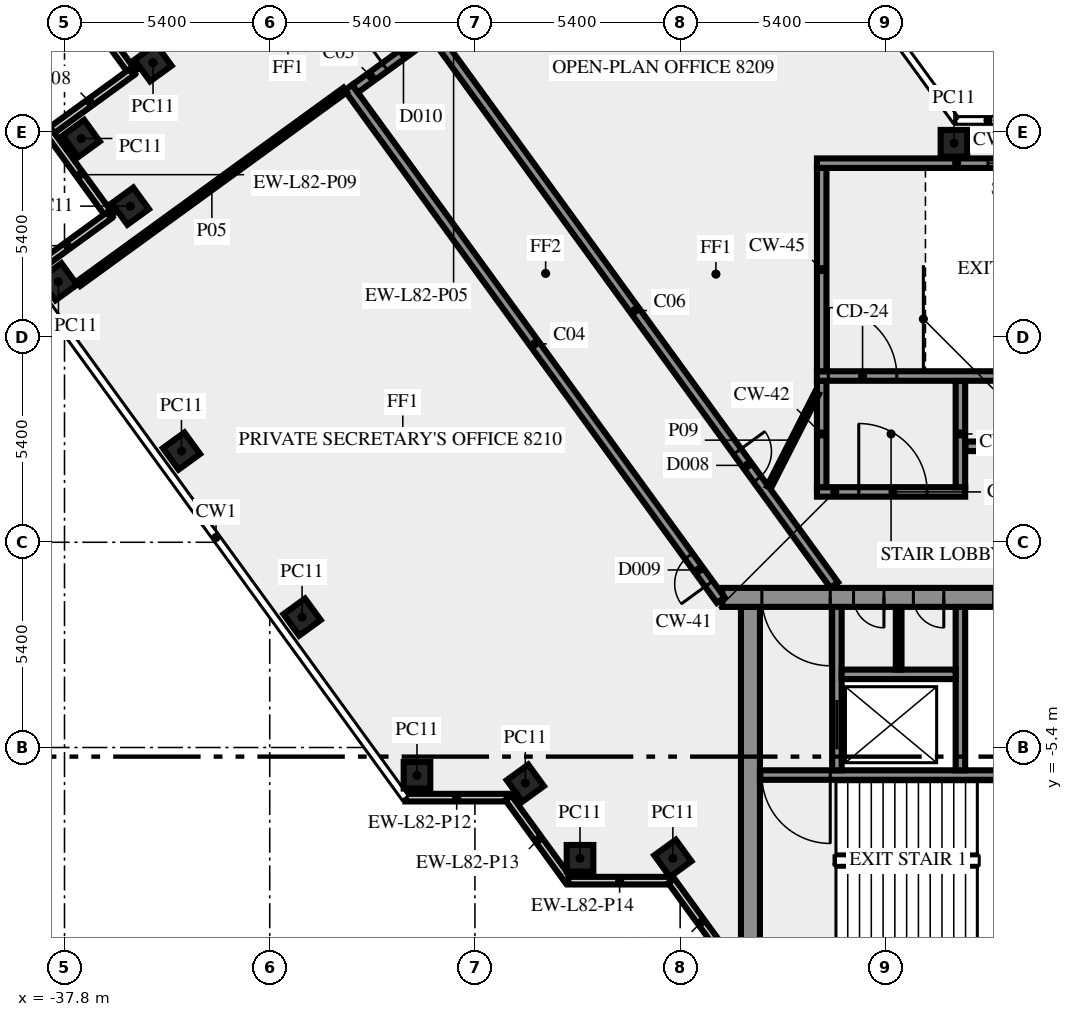
"""IFC4 building model, lengths in metres.
Left out: names, types, materials, properties, quantities, classifications, styles, units other than length and angle.
Written with IfcOpenShell. Run it as: python <this file> out.ifc"""

import sys

from ifc_helpers import new_model, si_unit, direction, frame, frame_2d, origin, origin_2d, place, context, subcontext, project, spatial, rectangle, extrude, element, fill, save


model = new_model("IFC4")
c1 = context("Model", 3, precision=1e-05, world=origin(), true_north=direction((0.0, 1.0)))
c2 = subcontext(c1, "Body", "Model", "MODEL_VIEW")
j1 = project(units=[si_unit("LENGTHUNIT", "METRE"), si_unit("PLANEANGLEUNIT", "RADIAN")], contexts=[c1])
p1 = place(None, origin())
s1 = spatial("IfcSite", under=j1, at=p1, CompositionType="ELEMENT")
p2 = place(p1, origin())
s2 = spatial("IfcBuilding", under=s1, at=p2, CompositionType="ELEMENT")
p3 = place(p2, frame((0.0, 0.0, 351.0)))
s3 = spatial("IfcBuildingStorey", under=s2, at=p3, CompositionType="ELEMENT", Elevation=351.0)
for number, where, z_axis, x_axis in (
    (1, (-35.471, 12.616, 0.0), (0.0, 0.0, 1.0), (-0.809, -0.588, 0.0)),
    (2, (-37.36, 10.625, 0.0), (0.0, 0.0, 1.0), (0.588, -0.809, 0.0)),
    (3, (-36.068, 8.844, 0.0), (0.0, 0.0, 1.0), (0.588, -0.809, 0.0)),
    (4, (-37.96, 6.855, 0.0), (0.0, 0.0, 1.0), (0.588, -0.809, 0.0)),
    (5, (-34.722, 2.4, 0.0), (0.0, 0.0, 1.0), (0.588, -0.809, 0.0)),
    (6, (-31.548, -1.969, 0.0), (0.0, 0.0, 1.0), (0.588, -0.809, 0.0)),
    (7, (-28.525, -6.13, 0.0), (0.0, 0.0, 1.0), (1.0, 0.0, 0.0)),
    (8, (-25.674, -6.337, 0.0), (0.0, 0.0, 1.0), (0.588, -0.809, 0.0)),
    (9, (-24.235, -8.315, 0.0), (0.0, 0.0, 1.0), (1.0, 0.0, 0.0)),
    (10, (-21.792, -8.315, 0.0), (0.0, 0.0, 1.0), (0.588, -0.809, 0.0)),
    (11, (-14.395, 10.5, 0.0), (0.0, 0.0, 1.0), (-1.0, 0.0, 0.0)),
):
    element("IfcColumn", number, at=place(p3, frame(where, z_axis=z_axis, x_axis=x_axis)), inside=s3, PredefinedType="COLUMN", context=c2, shape_type="SweptSolid", body=[
        extrude(rectangle(XDim=0.7, YDim=0.7, at=origin_2d()), origin(), (0.0, 0.0, 1.0), 3.2),
    ])
for number, where, z_axis, x_axis in (
    (12, (-37.592, 14.536, 0.0), (0.0, 0.0, 1.0), (0.588, -0.809, 0.0)),
    (13, (-36.032, 12.369, 0.0), (0.0, 0.0, 1.0), (-0.809, -0.588, 0.0)),
    (14, (-38.189, 10.765, 0.0), (0.0, 0.0, 1.0), (0.588, -0.809, 0.0)),
    (15, (-36.629, 8.597, 0.0), (0.0, 0.0, 1.0), (-0.809, -0.588, 0.0)),
    (16, (-28.83, -6.719, 0.0), (0.0, 0.0, 1.0), (1.0, 0.0, 0.0)),
):
    element("IfcWall", number, at=place(p3, frame(where, z_axis=z_axis, x_axis=x_axis)), inside=s3, PredefinedType="SOLIDWALL", context=c2, shape_type="SweptSolid", body=[
        extrude(rectangle(XDim=2.7, YDim=0.2, at=frame_2d((1.35, 0.0))), origin(), (0.0, 0.0, 1.0), 3.2),
    ])
p4 = place(p3, frame((-26.12, -6.724, 0.0), z_axis=(0.0, 0.0, 1.0), x_axis=(0.587720002413, -0.809064397168, 0.0)))
e17 = element("IfcWall", 17, at=p4, inside=s3, PredefinedType="SOLIDWALL", context=c2, shape_type="SweptSolid", body=[
    extrude(rectangle(XDim=2.7, YDim=0.2, at=frame_2d((1.35, 0.0))), origin(), (0.0, 0.0, 1.0), 3.2),
])
p5 = place(p3, frame((-24.543, -8.904, 0.0), z_axis=(0.0, 0.0, 1.0), x_axis=(1.0, 0.0, 0.0)))
e18 = element("IfcWall", 18, at=p5, inside=s3, PredefinedType="SOLIDWALL", context=c2, shape_type="SweptSolid", body=[
    extrude(rectangle(XDim=2.7, YDim=0.2, at=frame_2d((1.35, 0.0))), origin(), (0.0, 0.0, 1.0), 3.2),
])
p6 = place(p3, frame((-21.833, -8.909, 0.0), z_axis=(0.0, 0.0, 1.0), x_axis=(0.587766567315, -0.809030569476, 0.0)))
e19 = element("IfcWall", 19, at=p6, inside=s3, PredefinedType="SOLIDWALL", context=c2, shape_type="SweptSolid", body=[
    extrude(rectangle(XDim=2.688, YDim=0.2, at=frame_2d((1.344, 0.0))), origin(), (0.0, 0.0, 1.0), 3.2),
])
p7 = place(p3, frame((-19.75, -10.5, 0.0), z_axis=(0.0, 0.0, 1.0), x_axis=(0.0, 1.0, 0.0)))
e20 = element("IfcWall", 20, at=p7, inside=s3, PredefinedType="SHEAR", context=c2, shape_type="SweptSolid", body=[
    extrude(rectangle(XDim=8.8, YDim=0.5, at=frame_2d((4.4, 0.0))), origin(), (0.0, 0.0, 1.0), 3.2),
])
p8 = place(p3, frame((-11.45, -6.125, 0.0), z_axis=(0.0, 0.0, 1.0), x_axis=(-1.0, 0.0, 0.0)))
e21 = element("IfcWall", 21, at=p8, inside=s3, PredefinedType="SHEAR", context=c2, shape_type="SweptSolid", body=[
    extrude(rectangle(XDim=8.05, YDim=0.25, at=frame_2d((4.025, 0.0))), origin(), (0.0, 0.0, 1.0), 3.2),
])
p9 = place(p8, frame((6.2, 0.0, 0.0)))
e22 = element("IfcOpeningElement", 22, at=p9, cuts=e21, PredefinedType="OPENING", context=c2, shape_type="SweptSolid", body=[
    extrude(rectangle(XDim=1.8, YDim=2.1, at=frame_2d((0.9, 1.05))), frame((0.0, 0.135, 0.0), z_axis=(0.0, -1.0, 0.0), x_axis=(1.0, 0.0, 0.0)), (0.0, 0.0, 1.0), 0.27),
])
p10 = place(p3, frame((-17.475, -6.0, 0.0), z_axis=(0.0, 0.0, 1.0), x_axis=(0.0, 1.0, 0.0)))
e23 = element("IfcWall", 23, at=p10, inside=s3, PredefinedType="SHEAR", context=c2, shape_type="SweptSolid", body=[
    extrude(rectangle(XDim=4.3, YDim=0.25, at=frame_2d((2.15, 0.0))), origin(), (0.0, 0.0, 1.0), 3.2),
])
p11 = place(p10, frame((0.55, 0.0, 0.0)))
e24 = element("IfcOpeningElement", 24, at=p11, cuts=e23, PredefinedType="OPENING", context=c2, shape_type="SweptSolid", body=[
    extrude(rectangle(XDim=1.3, YDim=2.1, at=frame_2d((0.65, 1.05))), frame((0.0, 0.135, 0.0), z_axis=(0.0, -1.0, 0.0), x_axis=(1.0, 0.0, 0.0)), (0.0, 0.0, 1.0), 0.27),
])
p12 = place(p3, frame((-14.225, -6.0, 0.0), z_axis=(0.0, 0.0, 1.0), x_axis=(0.0, 1.0, 0.0)))
e25 = element("IfcWall", 25, at=p12, inside=s3, PredefinedType="SHEAR", context=c2, shape_type="SweptSolid", body=[
    extrude(rectangle(XDim=4.3, YDim=0.25, at=frame_2d((2.15, 0.0))), origin(), (0.0, 0.0, 1.0), 3.2),
])
p13 = place(p3, frame((-17.35, -3.475, 0.0), z_axis=(0.0, 0.0, 1.0), x_axis=(1.0, 0.0, 0.0)))
e26 = element("IfcWall", 26, at=p13, inside=s3, PredefinedType="SHEAR", context=c2, shape_type="SweptSolid", body=[
    extrude(rectangle(XDim=3.0, YDim=0.25, at=frame_2d((1.5, 0.0))), origin(), (0.0, 0.0, 1.0), 3.2),
])
p14 = place(p3, frame((-15.85, -3.35, 0.0), z_axis=(0.0, 0.0, 1.0), x_axis=(0.0, 1.0, 0.0)))
e27 = element("IfcWall", 27, at=p14, inside=s3, PredefinedType="PARTITIONING", context=c2, shape_type="SweptSolid", body=[
    extrude(rectangle(XDim=1.65, YDim=0.15, at=frame_2d((0.825, 0.0))), origin(), (0.0, 0.0, 1.0), 3.2),
])
p15 = place(p3, frame((20.49, -1.45, 0.0), z_axis=(0.0, 0.0, 1.0), x_axis=(-1.0, 0.0, 0.0)))
e28 = element("IfcWall", 28, at=p15, inside=s3, PredefinedType="SHEAR", context=c2, shape_type="SweptSolid", body=[
    extrude(rectangle(XDim=40.98, YDim=0.5, at=frame_2d((20.49, 0.0))), origin(), (0.0, 0.0, 1.0), 3.2),
])
p16 = place(p15, frame((38.14, 0.0, 0.0)))
e29 = element("IfcOpeningElement", 29, at=p16, cuts=e28, PredefinedType="OPENING", context=c2, shape_type="SweptSolid", body=[
    extrude(rectangle(XDim=1.8, YDim=2.1, at=frame_2d((0.9, 1.05))), frame((0.0, 0.26, 0.0), z_axis=(0.0, -1.0, 0.0), x_axis=(1.0, 0.0, 0.0)), (0.0, 0.0, 1.0), 0.52),
])
p17 = place(p15, frame((36.728, 0.0, 0.0)))
e30 = element("IfcOpeningElement", 30, at=p17, cuts=e28, PredefinedType="OPENING", context=c2, shape_type="SweptSolid", body=[
    extrude(rectangle(XDim=0.8, YDim=2.1, at=frame_2d((0.4, 1.05))), frame((0.0, 0.26, 0.0), z_axis=(0.0, -1.0, 0.0), x_axis=(1.0, 0.0, 0.0)), (0.0, 0.0, 1.0), 0.52),
])
p18 = place(p15, frame((35.153, 0.0, 0.0)))
e31 = element("IfcOpeningElement", 31, at=p18, cuts=e28, PredefinedType="OPENING", context=c2, shape_type="SweptSolid", body=[
    extrude(rectangle(XDim=0.8, YDim=2.1, at=frame_2d((0.4, 1.05))), frame((0.0, 0.26, 0.0), z_axis=(0.0, -1.0, 0.0), x_axis=(1.0, 0.0, 0.0)), (0.0, 0.0, 1.0), 0.52),
])
p19 = place(p15, frame((32.94, 0.0, 0.0)))
e32 = element("IfcOpeningElement", 32, at=p19, cuts=e28, PredefinedType="OPENING", context=c2, shape_type="SweptSolid", body=[
    extrude(rectangle(XDim=0.9, YDim=2.1, at=frame_2d((0.45, 1.05))), frame((0.0, 0.26, 0.0), z_axis=(0.0, -1.0, 0.0), x_axis=(1.0, 0.0, 0.0)), (0.0, 0.0, 1.0), 0.52),
])
p20 = place(p15, frame((31.015, 0.0, 0.0)))
e33 = element("IfcOpeningElement", 33, at=p20, cuts=e28, PredefinedType="OPENING", context=c2, shape_type="SweptSolid", body=[
    extrude(rectangle(XDim=0.8, YDim=2.1, at=frame_2d((0.4, 1.05))), frame((0.0, 0.26, 0.0), z_axis=(0.0, -1.0, 0.0), x_axis=(1.0, 0.0, 0.0)), (0.0, 0.0, 1.0), 0.52),
])
p21 = place(p15, frame((24.765, 0.0, 0.0)))
e34 = element("IfcOpeningElement", 34, at=p21, cuts=e28, PredefinedType="OPENING", context=c2, shape_type="SweptSolid", body=[
    extrude(rectangle(XDim=0.8, YDim=2.1, at=frame_2d((0.4, 1.05))), frame((0.0, 0.26, 0.0), z_axis=(0.0, -1.0, 0.0), x_axis=(1.0, 0.0, 0.0)), (0.0, 0.0, 1.0), 0.52),
])
p22 = place(p15, frame((21.765, 0.0, 0.0)))
e35 = element("IfcOpeningElement", 35, at=p22, cuts=e28, PredefinedType="OPENING", context=c2, shape_type="SweptSolid", body=[
    extrude(rectangle(XDim=2.0, YDim=2.1, at=frame_2d((1.0, 1.05))), frame((0.0, 0.26, 0.0), z_axis=(0.0, -1.0, 0.0), x_axis=(1.0, 0.0, 0.0)), (0.0, 0.0, 1.0), 0.52),
])
p23 = place(p15, frame((14.002, 0.0, 0.0)))
e36 = element("IfcOpeningElement", 36, at=p23, cuts=e28, PredefinedType="OPENING", context=c2, shape_type="SweptSolid", body=[
    extrude(rectangle(XDim=0.9, YDim=2.1, at=frame_2d((0.45, 1.05))), frame((0.0, 0.26, 0.0), z_axis=(0.0, -1.0, 0.0), x_axis=(1.0, 0.0, 0.0)), (0.0, 0.0, 1.0), 0.52),
])
p24 = place(p15, frame((10.278, 0.0, 0.0)))
e37 = element("IfcOpeningElement", 37, at=p24, cuts=e28, PredefinedType="OPENING", context=c2, shape_type="SweptSolid", body=[
    extrude(rectangle(XDim=0.9, YDim=2.1, at=frame_2d((0.45, 1.05))), frame((0.0, 0.26, 0.0), z_axis=(0.0, -1.0, 0.0), x_axis=(1.0, 0.0, 0.0)), (0.0, 0.0, 1.0), 0.52),
])
p25 = place(p15, frame((7.14, 0.0, 0.0)))
e38 = element("IfcOpeningElement", 38, at=p25, cuts=e28, PredefinedType="OPENING", context=c2, shape_type="SweptSolid", body=[
    extrude(rectangle(XDim=0.9, YDim=2.1, at=frame_2d((0.45, 1.05))), frame((0.0, 0.26, 0.0), z_axis=(0.0, -1.0, 0.0), x_axis=(1.0, 0.0, 0.0)), (0.0, 0.0, 1.0), 0.52),
])
p26 = place(p15, frame((4.19, 0.0, 0.0)))
e39 = element("IfcOpeningElement", 39, at=p26, cuts=e28, PredefinedType="OPENING", context=c2, shape_type="SweptSolid", body=[
    extrude(rectangle(XDim=0.9, YDim=2.1, at=frame_2d((0.45, 1.05))), frame((0.0, 0.26, 0.0), z_axis=(0.0, -1.0, 0.0), x_axis=(1.0, 0.0, 0.0)), (0.0, 0.0, 1.0), 0.52),
])
p27 = place(p15, frame((1.04, 0.0, 0.0)))
e40 = element("IfcOpeningElement", 40, at=p27, cuts=e28, PredefinedType="OPENING", context=c2, shape_type="SweptSolid", body=[
    extrude(rectangle(XDim=1.8, YDim=2.1, at=frame_2d((0.9, 1.05))), frame((0.0, 0.26, 0.0), z_axis=(0.0, -1.0, 0.0), x_axis=(1.0, 0.0, 0.0)), (0.0, 0.0, 1.0), 0.52),
])
p28 = place(p3, frame((-18.0, 1.325, 0.0), z_axis=(0.0, 0.0, 1.0), x_axis=(1.0, 0.0, 0.0)))
e41 = element("IfcWall", 41, at=p28, inside=s3, PredefinedType="SHEAR", context=c2, shape_type="SweptSolid", body=[
    extrude(rectangle(XDim=3.9, YDim=0.25, at=frame_2d((1.95, 0.0))), origin(), (0.0, 0.0, 1.0), 3.2),
])
p29 = place(p28, frame((1.1, 0.0, 0.0)))
e42 = element("IfcOpeningElement", 42, at=p29, cuts=e41, PredefinedType="OPENING", context=c2, shape_type="SweptSolid", body=[
    extrude(rectangle(XDim=1.8, YDim=2.1, at=frame_2d((0.9, 1.05))), frame((0.0, 0.135, 0.0), z_axis=(0.0, -1.0, 0.0), x_axis=(1.0, 0.0, 0.0)), (0.0, 0.0, 1.0), 0.27),
])
for number, where, z_axis, x_axis in (
    (43, (-17.875, 1.45, 0.0), (0.0, 0.0, 1.0), (0.0, 1.0, 0.0)),
    (44, (-14.225, 1.45, 0.0), (0.0, 0.0, 1.0), (0.0, 1.0, 0.0)),
):
    element("IfcWall", number, at=place(p3, frame(where, z_axis=z_axis, x_axis=x_axis)), inside=s3, PredefinedType="SHEAR", context=c2, shape_type="SweptSolid", body=[
        extrude(rectangle(XDim=2.8, YDim=0.25, at=frame_2d((1.4, 0.0))), origin(), (0.0, 0.0, 1.0), 3.2),
    ])
p30 = place(p3, frame((-18.0, 4.375, 0.0), z_axis=(0.0, 0.0, 1.0), x_axis=(1.0, 0.0, 0.0)))
e45 = element("IfcWall", 45, at=p30, inside=s3, PredefinedType="SHEAR", context=c2, shape_type="SweptSolid", body=[
    extrude(rectangle(XDim=10.5, YDim=0.25, at=frame_2d((5.25, 0.0))), origin(), (0.0, 0.0, 1.0), 3.2),
])
p31 = place(p30, frame((0.3, 0.0, 0.0)))
e46 = element("IfcOpeningElement", 46, at=p31, cuts=e45, PredefinedType="OPENING", context=c2, shape_type="SweptSolid", body=[
    extrude(rectangle(XDim=1.8, YDim=2.1, at=frame_2d((0.9, 1.05))), frame((0.0, 0.135, 0.0), z_axis=(0.0, -1.0, 0.0), x_axis=(1.0, 0.0, 0.0)), (0.0, 0.0, 1.0), 0.27),
])
p32 = place(p3, frame((-17.875, 4.5, 0.0), z_axis=(0.0, 0.0, 1.0), x_axis=(0.0, 1.0, 0.0)))
e47 = element("IfcWall", 47, at=p32, inside=s3, PredefinedType="SHEAR", context=c2, shape_type="SweptSolid", body=[
    extrude(rectangle(XDim=5.35, YDim=0.25, at=frame_2d((2.675, 0.0))), origin(), (0.0, 0.0, 1.0), 3.2),
])
p33 = place(p3, frame((-18.0, 9.975, 0.0), z_axis=(0.0, 0.0, 1.0), x_axis=(1.0, 0.0, 0.0)))
e48 = element("IfcWall", 48, at=p33, inside=s3, PredefinedType="SHEAR", context=c2, shape_type="SweptSolid", body=[
    extrude(rectangle(XDim=10.5, YDim=0.25, at=frame_2d((5.25, 0.0))), origin(), (0.0, 0.0, 1.0), 3.2),
])
p34 = place(p33, frame((4.5, 0.0, 1.0)))
e49 = element("IfcOpeningElement", 49, at=p34, cuts=e48, PredefinedType="OPENING", context=c2, shape_type="SweptSolid", body=[
    extrude(rectangle(XDim=1.2, YDim=1.2, at=frame_2d((0.6, 0.6))), frame((0.0, 0.135, 0.0), z_axis=(0.0, -1.0, 0.0), x_axis=(1.0, 0.0, 0.0)), (0.0, 0.0, 1.0), 0.27),
])
p35 = place(p3, frame((-20.531, -1.523, 0.0), z_axis=(0.0, 0.0, 1.0), x_axis=(-0.587785867777, 0.809016547199, 0.0)))
e50 = element("IfcWall", 50, at=p35, inside=s3, PredefinedType="SOLIDWALL", context=c2, shape_type="SweptSolid", body=[
    extrude(rectangle(XDim=16.67, YDim=0.25, at=frame_2d((8.335, 0.0))), origin(), (0.0, 0.0, 1.0), 3.2),
])
p36 = place(p35, frame((0.533, 0.0, 0.0)))
e51 = element("IfcOpeningElement", 51, at=p36, cuts=e50, PredefinedType="OPENING", context=c2, shape_type="SweptSolid", body=[
    extrude(rectangle(XDim=0.9, YDim=2.1, at=frame_2d((0.45, 1.05))), frame((0.0, 0.135, 0.0), z_axis=(0.0, -1.0, 0.0), x_axis=(1.0, 0.0, 0.0)), (0.0, 0.0, 1.0), 0.27),
])
p37 = place(p3, frame((-30.155, 11.936, 0.0), z_axis=(0.0, 0.0, 1.0), x_axis=(0.809038743598, 0.587755315891, 0.0)))
e52 = element("IfcWall", 52, at=p37, inside=s3, PredefinedType="SOLIDWALL", context=c2, shape_type="SweptSolid", body=[
    extrude(rectangle(XDim=2.65, YDim=0.25, at=frame_2d((1.325, 0.0))), origin(), (0.0, 0.0, 1.0), 3.2),
])
p38 = place(p37, frame((0.976, 0.0, 0.0)))
e53 = element("IfcOpeningElement", 53, at=p38, cuts=e52, PredefinedType="OPENING", context=c2, shape_type="SweptSolid", body=[
    extrude(rectangle(XDim=1.2, YDim=2.1, at=frame_2d((0.6, 1.05))), frame((0.0, 0.135, 0.0), z_axis=(0.0, -1.0, 0.0), x_axis=(1.0, 0.0, 0.0)), (0.0, 0.0, 1.0), 0.27),
])
p39 = place(p3, frame((-28.039, 13.319, 0.0), z_axis=(0.0, 0.0, 1.0), x_axis=(0.587791911753, -0.809012155952, 0.0)))
e54 = element("IfcWall", 54, at=p39, inside=s3, PredefinedType="SOLIDWALL", context=c2, shape_type="SweptSolid", body=[
    extrude(rectangle(XDim=17.853, YDim=0.25, at=frame_2d((8.927, 0.0))), origin(), (0.0, 0.0, 1.0), 3.2),
])
p40 = place(p39, frame((13.512, 0.0, 0.0)))
e55 = element("IfcOpeningElement", 55, at=p40, cuts=e54, PredefinedType="OPENING", context=c2, shape_type="SweptSolid", body=[
    extrude(rectangle(XDim=0.9, YDim=2.1, at=frame_2d((0.45, 1.05))), frame((0.0, 0.135, 0.0), z_axis=(0.0, -1.0, 0.0), x_axis=(1.0, 0.0, 0.0)), (0.0, 0.0, 1.0), 0.27),
])
p41 = place(p3, frame((-14.09, 2.525, 0.0), z_axis=(0.0, 0.0, 1.0), x_axis=(1.0, 0.0, 0.0)))
e56 = element("IfcWall", 56, at=p41, inside=s3, PredefinedType="SOLIDWALL", context=c2, shape_type="SweptSolid", body=[
    extrude(rectangle(XDim=8.84, YDim=0.25, at=frame_2d((4.42, 0.0))), origin(), (0.0, 0.0, 1.0), 3.2),
])
p42 = place(p3, frame((-37.429, 6.805, 0.0), z_axis=(0.0, 0.0, 1.0), x_axis=(0.809020922653, 0.587779845444, 0.0)))
e57 = element("IfcWall", 57, at=p42, inside=s3, PredefinedType="PARTITIONING", context=c2, shape_type="SweptSolid", body=[
    extrude(rectangle(XDim=8.67, YDim=0.15, at=frame_2d((4.335, 0.0))), origin(), (0.0, 0.0, 1.0), 3.2),
])
p43 = place(p3, frame((-19.261, 1.45, 0.0), z_axis=(0.0, 0.0, 1.0), x_axis=(0.453950796792, 0.891026752736, 0.0)))
e58 = element("IfcWall", 58, at=p43, inside=s3, PredefinedType="PARTITIONING", context=c2, shape_type="SweptSolid", body=[
    extrude(rectangle(XDim=2.778, YDim=0.12, at=frame_2d((1.389, 0.0))), origin(), (0.0, 0.0, 1.0), 3.2),
])
p44 = place(p9, origin())
e59 = element("IfcDoor", 59, at=p44, inside=s3, OperationType="DOUBLE_DOOR_SINGLE_SWING", PredefinedType="DOOR", context=c2, shape_type="SweptSolid", body=[
    extrude(rectangle(XDim=1.8, YDim=2.1, at=frame_2d((0.9, 1.05))), frame((0.0, 0.025, 0.0), z_axis=(0.0, -1.0, 0.0), x_axis=(1.0, 0.0, 0.0)), (0.0, 0.0, 1.0), 0.05),
])
fill(e22, e59)
p45 = place(p11, origin())
e60 = element("IfcDoor", 60, at=p45, inside=s3, OperationType="DOUBLE_DOOR_SLIDING", PredefinedType="DOOR", context=c2, shape_type="SweptSolid", body=[
    extrude(rectangle(XDim=1.3, YDim=2.1, at=frame_2d((0.65, 1.05))), frame((0.0, 0.025, 0.0), z_axis=(0.0, -1.0, 0.0), x_axis=(1.0, 0.0, 0.0)), (0.0, 0.0, 1.0), 0.05),
])
fill(e24, e60)
p46 = place(p16, origin())
e61 = element("IfcDoor", 61, at=p46, inside=s3, OperationType="DOUBLE_DOOR_SINGLE_SWING", PredefinedType="DOOR", context=c2, shape_type="SweptSolid", body=[
    extrude(rectangle(XDim=1.8, YDim=2.1, at=frame_2d((0.9, 1.05))), frame((0.0, 0.025, 0.0), z_axis=(0.0, -1.0, 0.0), x_axis=(1.0, 0.0, 0.0)), (0.0, 0.0, 1.0), 0.05),
])
fill(e29, e61)
p47 = place(p17, origin())
e62 = element("IfcDoor", 62, at=p47, inside=s3, OperationType="SINGLE_SWING_RIGHT", PredefinedType="DOOR", context=c2, shape_type="SweptSolid", body=[
    extrude(rectangle(XDim=0.8, YDim=2.1, at=frame_2d((0.4, 1.05))), frame((0.0, 0.025, 0.0), z_axis=(0.0, -1.0, 0.0), x_axis=(1.0, 0.0, 0.0)), (0.0, 0.0, 1.0), 0.05),
])
fill(e30, e62)
p48 = place(p18, origin())
e63 = element("IfcDoor", 63, at=p48, inside=s3, OperationType="SINGLE_SWING_RIGHT", PredefinedType="DOOR", context=c2, shape_type="SweptSolid", body=[
    extrude(rectangle(XDim=0.8, YDim=2.1, at=frame_2d((0.4, 1.05))), frame((0.0, 0.025, 0.0), z_axis=(0.0, -1.0, 0.0), x_axis=(1.0, 0.0, 0.0)), (0.0, 0.0, 1.0), 0.05),
])
fill(e31, e63)
p49 = place(p29, origin())
e64 = element("IfcDoor", 64, at=p49, inside=s3, OperationType="DOUBLE_DOOR_SINGLE_SWING", PredefinedType="DOOR", context=c2, shape_type="SweptSolid", body=[
    extrude(rectangle(XDim=1.8, YDim=2.1, at=frame_2d((0.9, 1.05))), frame((0.0, 0.025, 0.0), z_axis=(0.0, -1.0, 0.0), x_axis=(1.0, 0.0, 0.0)), (0.0, 0.0, 1.0), 0.05),
])
fill(e42, e64)
p50 = place(p31, origin())
e65 = element("IfcDoor", 65, at=p50, inside=s3, OperationType="DOUBLE_DOOR_SINGLE_SWING", PredefinedType="DOOR", context=c2, shape_type="SweptSolid", body=[
    extrude(rectangle(XDim=1.8, YDim=2.1, at=frame_2d((0.9, 1.05))), frame((0.0, 0.025, 0.0), z_axis=(0.0, -1.0, 0.0), x_axis=(1.0, 0.0, 0.0)), (0.0, 0.0, 1.0), 0.05),
])
fill(e46, e65)
p51 = place(p34, origin())
e66 = element("IfcWindow", 66, at=p51, inside=s3, PartitioningType="SINGLE_PANEL", PredefinedType="WINDOW", context=c2, shape_type="SweptSolid", body=[
    extrude(rectangle(XDim=1.2, YDim=1.2, at=frame_2d((0.6, 0.6))), frame((0.0, 0.03, 0.0), z_axis=(0.0, -1.0, 0.0), x_axis=(1.0, 0.0, 0.0)), (0.0, 0.0, 1.0), 0.06),
])
fill(e49, e66)
p52 = place(p40, origin())
e67 = element("IfcDoor", 67, at=p52, inside=s3, OperationType="SINGLE_SWING_RIGHT", PredefinedType="DOOR", context=c2, shape_type="SweptSolid", body=[
    extrude(rectangle(XDim=0.9, YDim=2.1, at=frame_2d((0.45, 1.05))), frame((0.0, 0.025, 0.0), z_axis=(0.0, -1.0, 0.0), x_axis=(1.0, 0.0, 0.0)), (0.0, 0.0, 1.0), 0.05),
])
fill(e55, e67)
p53 = place(p38, origin())
e68 = element("IfcDoor", 68, at=p53, inside=s3, OperationType="SINGLE_SWING_RIGHT", PredefinedType="DOOR", context=c2, shape_type="SweptSolid", body=[
    extrude(rectangle(XDim=1.2, YDim=2.1, at=frame_2d((0.6, 1.05))), frame((0.0, 0.025, 0.0), z_axis=(0.0, -1.0, 0.0), x_axis=(1.0, 0.0, 0.0)), (0.0, 0.0, 1.0), 0.05),
])
fill(e53, e68)
p54 = place(p36, origin())
e69 = element("IfcDoor", 69, at=p54, inside=s3, OperationType="SINGLE_SWING_LEFT", PredefinedType="DOOR", context=c2, shape_type="SweptSolid", body=[
    extrude(rectangle(XDim=0.9, YDim=2.1, at=frame_2d((0.45, 1.05))), frame((0.0, 0.025, 0.0), z_axis=(0.0, -1.0, 0.0), x_axis=(1.0, 0.0, 0.0)), (0.0, 0.0, 1.0), 0.05),
])
fill(e51, e69)
save(model, sys.argv[1])
